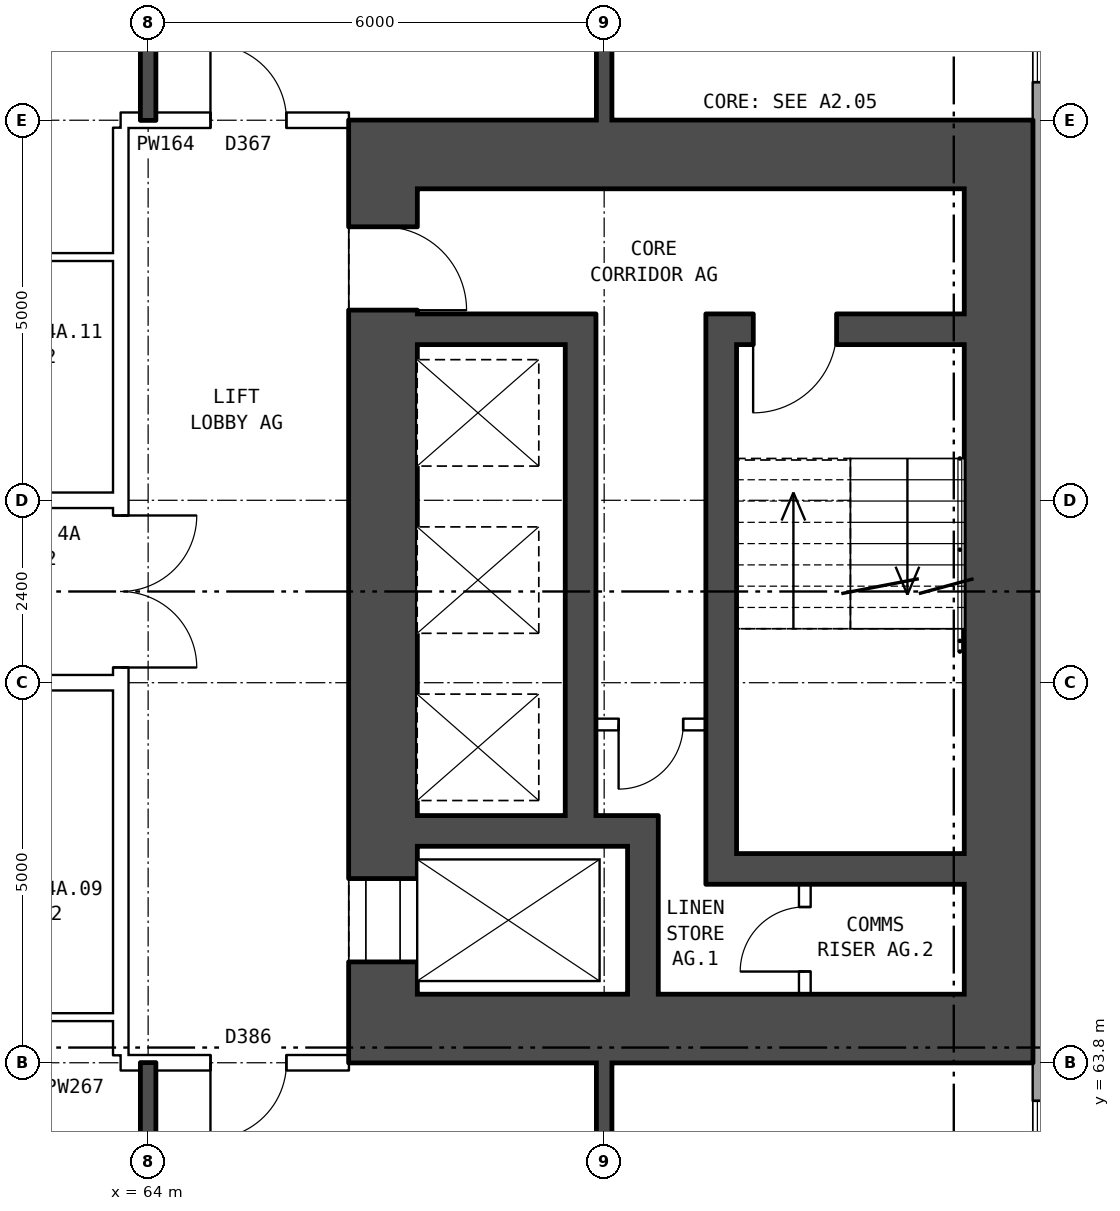
"""IFC4 building model, lengths in metres.
Left out: names, types, materials, properties, quantities, classifications, styles, units other than length and angle.
Written with IfcOpenShell. Run it as: python <this file> out.ifc"""

import sys

from ifc_helpers import new_model, si_unit, direction, frame, frame_2d, origin, place, context, subcontext, project, spatial, rectangle, extrude, element, fill, save


model = new_model("IFC4")
c1 = context("Model", 3, precision=1e-05, world=origin(), true_north=direction((0.0, 1.0)))
c2 = subcontext(c1, "Body", "Model", "MODEL_VIEW")
j1 = project(units=[si_unit("LENGTHUNIT", "METRE"), si_unit("PLANEANGLEUNIT", "RADIAN")], contexts=[c1])
p1 = place(None, origin())
s1 = spatial("IfcSite", under=j1, at=p1, CompositionType="ELEMENT")
p2 = place(p1, origin())
s2 = spatial("IfcBuilding", under=s1, at=p2, CompositionType="ELEMENT")
p3 = place(p2, frame((0.0, 0.0, 19.5)))
s3 = spatial("IfcBuildingStorey", under=s2, at=p3, CompositionType="ELEMENT", Elevation=19.5)
p4 = place(p3, frame((75.82, 57.075, 0.0), z_axis=(0.0, 0.0, 1.0), x_axis=(0.0, 1.0, 0.0)))
e1 = element("IfcWall", 1, at=p4, inside=s3, PredefinedType="STANDARD", context=c2, shape_type="SweptSolid", body=[
    extrude(rectangle(XDim=25.851, YDim=0.36, at=frame_2d((12.925, 0.0))), origin(), (0.0, 0.0, 1.0), 2.85),
])
p5 = place(p4, frame((1.475, 0.0, 0.8)))
e2 = element("IfcOpeningElement", 2, at=p5, cuts=e1, PredefinedType="OPENING", context=c2, shape_type="SweptSolid", body=[
    extrude(rectangle(XDim=1.0, YDim=1.2, at=frame_2d((0.5, 0.6))), frame((0.0, 0.19, 0.0), z_axis=(0.0, -1.0, 0.0), x_axis=(1.0, 0.0, 0.0)), (0.0, 0.0, 1.0), 0.38),
])
p6 = place(p4, frame((4.625, 0.0, 0.8)))
e3 = element("IfcOpeningElement", 3, at=p6, cuts=e1, PredefinedType="OPENING", context=c2, shape_type="SweptSolid", body=[
    extrude(rectangle(XDim=1.6, YDim=1.8, at=frame_2d((0.8, 0.9))), frame((0.0, 0.19, 0.0), z_axis=(0.0, -1.0, 0.0), x_axis=(1.0, 0.0, 0.0)), (0.0, 0.0, 1.0), 0.38),
])
p7 = place(p4, frame((19.625, 0.0, 0.8)))
e4 = element("IfcOpeningElement", 4, at=p7, cuts=e1, PredefinedType="OPENING", context=c2, shape_type="SweptSolid", body=[
    extrude(rectangle(XDim=1.6, YDim=1.8, at=frame_2d((0.8, 0.9))), frame((0.0, 0.19, 0.0), z_axis=(0.0, -1.0, 0.0), x_axis=(1.0, 0.0, 0.0)), (0.0, 0.0, 1.0), 0.38),
])
p8 = place(p4, frame((21.525, 0.0, 0.8)))
e5 = element("IfcOpeningElement", 5, at=p8, cuts=e1, PredefinedType="OPENING", context=c2, shape_type="SweptSolid", body=[
    extrude(rectangle(XDim=1.4, YDim=1.8, at=frame_2d((0.7, 0.9))), frame((0.0, 0.19, 0.0), z_axis=(0.0, -1.0, 0.0), x_axis=(1.0, 0.0, 0.0)), (0.0, 0.0, 1.0), 0.38),
])
p9 = place(p4, frame((2.775, 0.0, 0.8)))
e6 = element("IfcOpeningElement", 6, at=p9, cuts=e1, PredefinedType="OPENING", context=c2, shape_type="SweptSolid", body=[
    extrude(rectangle(XDim=1.4, YDim=1.8, at=frame_2d((0.7, 0.9))), frame((0.0, 0.19, 0.0), z_axis=(0.0, -1.0, 0.0), x_axis=(1.0, 0.0, 0.0)), (0.0, 0.0, 1.0), 0.38),
])
p10 = place(p4, frame((23.225, 0.0, 0.8)))
e7 = element("IfcOpeningElement", 7, at=p10, cuts=e1, PredefinedType="OPENING", context=c2, shape_type="SweptSolid", body=[
    extrude(rectangle(XDim=1.0, YDim=1.2, at=frame_2d((0.5, 0.6))), frame((0.0, 0.19, 0.0), z_axis=(0.0, -1.0, 0.0), x_axis=(1.0, 0.0, 0.0)), (0.0, 0.0, 1.0), 0.38),
])
p11 = place(p3, frame((67.09, 64.7, 0.0), z_axis=(0.0, 0.0, 1.0), x_axis=(0.0, 1.0, 0.0)))
e8 = element("IfcWall", 8, at=p11, inside=s3, PredefinedType="SHEAR", context=c2, shape_type="SweptSolid", body=[
    extrude(rectangle(XDim=10.6, YDim=0.9, at=frame_2d((5.3, 0.0))), origin(), (0.0, 0.0, 1.0), 2.85),
])
p12 = place(p11, frame((0.425, 0.0, 0.0)))
e9 = element("IfcOpeningElement", 9, at=p12, cuts=e8, PredefinedType="OPENING", context=c2, shape_type="SweptSolid", body=[
    extrude(rectangle(XDim=1.1, YDim=2.1, at=frame_2d((0.55, 1.05))), frame((0.0, 0.46, 0.0), z_axis=(0.0, -1.0, 0.0), x_axis=(1.0, 0.0, 0.0)), (0.0, 0.0, 1.0), 0.92),
])
p13 = place(p11, frame((9.0, 0.0, 0.0)))
e10 = element("IfcOpeningElement", 10, at=p13, cuts=e8, PredefinedType="OPENING", context=c2, shape_type="SweptSolid", body=[
    extrude(rectangle(XDim=1.1, YDim=2.1, at=frame_2d((0.55, 1.05))), frame((0.0, 0.46, 0.0), z_axis=(0.0, -1.0, 0.0), x_axis=(1.0, 0.0, 0.0)), (0.0, 0.0, 1.0), 0.92),
])
p14 = place(p3, frame((75.19, 64.7, 0.0), z_axis=(0.0, 0.0, 1.0), x_axis=(0.0, 1.0, 0.0)))
e11 = element("IfcWall", 11, at=p14, inside=s3, PredefinedType="SHEAR", context=c2, shape_type="SweptSolid", body=[
    extrude(rectangle(XDim=10.6, YDim=0.9, at=frame_2d((5.3, 0.0))), origin(), (0.0, 0.0, 1.0), 2.85),
])
for number, where, z_axis, x_axis in (
    (12, (66.64, 64.25, 0.0), (0.0, 0.0, 1.0), (1.0, 0.0, 0.0)),
    (13, (66.64, 75.75, 0.0), (0.0, 0.0, 1.0), (1.0, 0.0, 0.0)),
):
    element("IfcWall", number, at=place(p3, frame(where, z_axis=z_axis, x_axis=x_axis)), inside=s3, PredefinedType="SHEAR", context=c2, shape_type="SweptSolid", body=[
        extrude(rectangle(XDim=9.0, YDim=0.9, at=frame_2d((4.5, 0.0))), origin(), (0.0, 0.0, 1.0), 2.85),
    ])
p15 = place(p3, frame((71.74, 66.35, 0.0), z_axis=(0.0, 0.0, 1.0), x_axis=(1.0, 0.0, 0.0)))
e14 = element("IfcWall", 14, at=p15, inside=s3, PredefinedType="SHEAR", context=c2, shape_type="SweptSolid", body=[
    extrude(rectangle(XDim=3.0, YDim=0.4, at=frame_2d((1.5, 0.0))), origin(), (0.0, 0.0, 1.0), 2.85),
])
p16 = place(p3, frame((67.54, 66.85, 0.0), z_axis=(0.0, 0.0, 1.0), x_axis=(1.0, 0.0, 0.0)))
e15 = element("IfcWall", 15, at=p16, inside=s3, PredefinedType="SHEAR", context=c2, shape_type="SweptSolid", body=[
    extrude(rectangle(XDim=3.17, YDim=0.4, at=frame_2d((1.585, 0.0))), origin(), (0.0, 0.0, 1.0), 2.85),
])
p17 = place(p3, frame((69.89, 68.25, 0.0), z_axis=(0.0, 0.0, 1.0), x_axis=(1.0, 0.0, 0.0)))
e16 = element("IfcWall", 16, at=p17, inside=s3, PredefinedType="PARTITIONING", context=c2, shape_type="SweptSolid", body=[
    extrude(rectangle(XDim=1.45, YDim=0.15, at=frame_2d((0.725, 0.0))), origin(), (0.0, 0.0, 1.0), 2.85),
])
p18 = place(p17, frame((0.3, 0.0, 0.0)))
e17 = element("IfcOpeningElement", 17, at=p18, cuts=e16, PredefinedType="OPENING", context=c2, shape_type="SweptSolid", body=[
    extrude(rectangle(XDim=0.85, YDim=2.1, at=frame_2d((0.425, 1.05))), frame((0.0, 0.085, 0.0), z_axis=(0.0, -1.0, 0.0), x_axis=(1.0, 0.0, 0.0)), (0.0, 0.0, 1.0), 0.17),
])
p19 = place(p3, frame((67.54, 73.45, 0.0), z_axis=(0.0, 0.0, 1.0), x_axis=(1.0, 0.0, 0.0)))
e18 = element("IfcWall", 18, at=p19, inside=s3, PredefinedType="SHEAR", context=c2, shape_type="SweptSolid", body=[
    extrude(rectangle(XDim=1.95, YDim=0.4, at=frame_2d((0.975, 0.0))), origin(), (0.0, 0.0, 1.0), 2.85),
])
p20 = place(p3, frame((71.74, 73.45, 0.0), z_axis=(0.0, 0.0, 1.0), x_axis=(1.0, 0.0, 0.0)))
e19 = element("IfcWall", 19, at=p20, inside=s3, PredefinedType="SHEAR", context=c2, shape_type="SweptSolid", body=[
    extrude(rectangle(XDim=3.0, YDim=0.4, at=frame_2d((1.5, 0.0))), origin(), (0.0, 0.0, 1.0), 2.85),
])
p21 = place(p20, frame((0.22, 0.0, 0.0)))
e20 = element("IfcOpeningElement", 20, at=p21, cuts=e19, PredefinedType="OPENING", context=c2, shape_type="SweptSolid", body=[
    extrude(rectangle(XDim=1.1, YDim=2.1, at=frame_2d((0.55, 1.05))), frame((0.0, 0.21, 0.0), z_axis=(0.0, -1.0, 0.0), x_axis=(1.0, 0.0, 0.0)), (0.0, 0.0, 1.0), 0.42),
])
p22 = place(p3, frame((69.69, 67.05, 0.0), z_axis=(0.0, 0.0, 1.0), x_axis=(0.0, 1.0, 0.0)))
e21 = element("IfcWall", 21, at=p22, inside=s3, PredefinedType="SHEAR", context=c2, shape_type="SweptSolid", body=[
    extrude(rectangle(XDim=6.6, YDim=0.4, at=frame_2d((3.3, 0.0))), origin(), (0.0, 0.0, 1.0), 2.85),
])
p23 = place(p3, frame((70.51, 64.7, 0.0), z_axis=(0.0, 0.0, 1.0), x_axis=(0.0, 1.0, 0.0)))
e22 = element("IfcWall", 22, at=p23, inside=s3, PredefinedType="SHEAR", context=c2, shape_type="SweptSolid", body=[
    extrude(rectangle(XDim=1.95, YDim=0.4, at=frame_2d((0.975, 0.0))), origin(), (0.0, 0.0, 1.0), 2.85),
])
p24 = place(p3, frame((71.54, 66.15, 0.0), z_axis=(0.0, 0.0, 1.0), x_axis=(0.0, 1.0, 0.0)))
e23 = element("IfcWall", 23, at=p24, inside=s3, PredefinedType="SHEAR", context=c2, shape_type="SweptSolid", body=[
    extrude(rectangle(XDim=7.5, YDim=0.4, at=frame_2d((3.75, 0.0))), origin(), (0.0, 0.0, 1.0), 2.85),
])
p25 = place(p3, frame((72.64, 64.7, 0.0), z_axis=(0.0, 0.0, 1.0), x_axis=(0.0, 1.0, 0.0)))
e24 = element("IfcWall", 24, at=p25, inside=s3, PredefinedType="PARTITIONING", context=c2, shape_type="SweptSolid", body=[
    extrude(rectangle(XDim=1.45, YDim=0.15, at=frame_2d((0.725, 0.0))), origin(), (0.0, 0.0, 1.0), 2.85),
])
p26 = place(p25, frame((0.3, 0.0, 0.0)))
e25 = element("IfcOpeningElement", 25, at=p26, cuts=e24, PredefinedType="OPENING", context=c2, shape_type="SweptSolid", body=[
    extrude(rectangle(XDim=0.85, YDim=2.1, at=frame_2d((0.425, 1.05))), frame((0.0, 0.085, 0.0), z_axis=(0.0, -1.0, 0.0), x_axis=(1.0, 0.0, 0.0)), (0.0, 0.0, 1.0), 0.17),
])
p27 = place(p3, frame((63.64, 63.9, 0.0), z_axis=(0.0, 0.0, 1.0), x_axis=(0.0, 1.0, 0.0)))
e26 = element("IfcWall", 26, at=p27, inside=s3, PredefinedType="PARTITIONING", context=c2, shape_type="SweptSolid", body=[
    extrude(rectangle(XDim=12.2, YDim=0.2, at=frame_2d((6.1, 0.0))), origin(), (0.0, 0.0, 1.0), 2.85),
])
p28 = place(p27, frame((5.1, 0.0, 0.0)))
e27 = element("IfcOpeningElement", 27, at=p28, cuts=e26, PredefinedType="OPENING", context=c2, shape_type="SweptSolid", body=[
    extrude(rectangle(XDim=2.0, YDim=2.1, at=frame_2d((1.0, 1.05))), frame((0.0, 0.11, 0.0), z_axis=(0.0, -1.0, 0.0), x_axis=(1.0, 0.0, 0.0)), (0.0, 0.0, 1.0), 0.22),
])
p29 = place(p3, frame((63.64, 63.8, 0.0), z_axis=(0.0, 0.0, 1.0), x_axis=(1.0, 0.0, 0.0)))
e28 = element("IfcWall", 28, at=p29, inside=s3, PredefinedType="PARTITIONING", context=c2, shape_type="SweptSolid", body=[
    extrude(rectangle(XDim=3.0, YDim=0.2, at=frame_2d((1.5, 0.0))), origin(), (0.0, 0.0, 1.0), 2.85),
])
p30 = place(p29, frame((1.18, 0.0, 0.0)))
e29 = element("IfcOpeningElement", 29, at=p30, cuts=e28, PredefinedType="OPENING", context=c2, shape_type="SweptSolid", body=[
    extrude(rectangle(XDim=1.0, YDim=2.1, at=frame_2d((0.5, 1.05))), frame((0.0, 0.11, 0.0), z_axis=(0.0, -1.0, 0.0), x_axis=(1.0, 0.0, 0.0)), (0.0, 0.0, 1.0), 0.22),
])
p31 = place(p3, frame((61.0, 64.4, 0.0), z_axis=(0.0, 0.0, 1.0), x_axis=(1.0, 0.0, 0.0)))
e30 = element("IfcWall", 30, at=p31, inside=s3, PredefinedType="PARTITIONING", context=c2, shape_type="SweptSolid", body=[
    extrude(rectangle(XDim=2.64, YDim=0.1, at=frame_2d((1.32, 0.0))), origin(), (0.0, 0.0, 1.0), 2.85),
])
p32 = place(p3, frame((44.36, 68.8, 0.0), z_axis=(0.0, 0.0, 1.0), x_axis=(1.0, 0.0, 0.0)))
e31 = element("IfcWall", 31, at=p32, inside=s3, PredefinedType="PARTITIONING", context=c2, shape_type="SweptSolid", body=[
    extrude(rectangle(XDim=19.28, YDim=0.2, at=frame_2d((9.64, 0.0))), origin(), (0.0, 0.0, 1.0), 2.85),
])
p33 = place(p32, frame((14.64, 0.0, 0.0)))
e32 = element("IfcOpeningElement", 32, at=p33, cuts=e31, PredefinedType="OPENING", context=c2, shape_type="SweptSolid", body=[
    extrude(rectangle(XDim=1.0, YDim=2.1, at=frame_2d((0.5, 1.05))), frame((0.0, 0.11, 0.0), z_axis=(0.0, -1.0, 0.0), x_axis=(1.0, 0.0, 0.0)), (0.0, 0.0, 1.0), 0.22),
])
p34 = place(p32, frame((5.64, 0.0, 0.0)))
e33 = element("IfcOpeningElement", 33, at=p34, cuts=e31, PredefinedType="OPENING", context=c2, shape_type="SweptSolid", body=[
    extrude(rectangle(XDim=1.0, YDim=2.1, at=frame_2d((0.5, 1.05))), frame((0.0, 0.11, 0.0), z_axis=(0.0, -1.0, 0.0), x_axis=(1.0, 0.0, 0.0)), (0.0, 0.0, 1.0), 0.22),
])
p35 = place(p3, frame((44.36, 71.2, 0.0), z_axis=(0.0, 0.0, 1.0), x_axis=(1.0, 0.0, 0.0)))
e34 = element("IfcWall", 34, at=p35, inside=s3, PredefinedType="PARTITIONING", context=c2, shape_type="SweptSolid", body=[
    extrude(rectangle(XDim=19.28, YDim=0.2, at=frame_2d((9.64, 0.0))), origin(), (0.0, 0.0, 1.0), 2.85),
])
p36 = place(p35, frame((14.64, 0.0, 0.0)))
e35 = element("IfcOpeningElement", 35, at=p36, cuts=e34, PredefinedType="OPENING", context=c2, shape_type="SweptSolid", body=[
    extrude(rectangle(XDim=1.0, YDim=2.1, at=frame_2d((0.5, 1.05))), frame((0.0, 0.11, 0.0), z_axis=(0.0, -1.0, 0.0), x_axis=(1.0, 0.0, 0.0)), (0.0, 0.0, 1.0), 0.22),
])
p37 = place(p35, frame((5.64, 0.0, 0.0)))
e36 = element("IfcOpeningElement", 36, at=p37, cuts=e34, PredefinedType="OPENING", context=c2, shape_type="SweptSolid", body=[
    extrude(rectangle(XDim=1.0, YDim=2.1, at=frame_2d((0.5, 1.05))), frame((0.0, 0.11, 0.0), z_axis=(0.0, -1.0, 0.0), x_axis=(1.0, 0.0, 0.0)), (0.0, 0.0, 1.0), 0.22),
])
p38 = place(p3, frame((61.0, 74.4, 0.0), z_axis=(0.0, 0.0, 1.0), x_axis=(1.0, 0.0, 0.0)))
e37 = element("IfcWall", 37, at=p38, inside=s3, PredefinedType="PARTITIONING", context=c2, shape_type="SweptSolid", body=[
    extrude(rectangle(XDim=2.64, YDim=0.1, at=frame_2d((1.32, 0.0))), origin(), (0.0, 0.0, 1.0), 2.85),
])
p39 = place(p3, frame((63.64, 76.2, 0.0), z_axis=(0.0, 0.0, 1.0), x_axis=(1.0, 0.0, 0.0)))
e38 = element("IfcWall", 38, at=p39, inside=s3, PredefinedType="PARTITIONING", context=c2, shape_type="SweptSolid", body=[
    extrude(rectangle(XDim=3.0, YDim=0.2, at=frame_2d((1.5, 0.0))), origin(), (0.0, 0.0, 1.0), 2.85),
])
p40 = place(p39, frame((1.18, 0.0, 0.0)))
e39 = element("IfcOpeningElement", 39, at=p40, cuts=e38, PredefinedType="OPENING", context=c2, shape_type="SweptSolid", body=[
    extrude(rectangle(XDim=1.0, YDim=2.1, at=frame_2d((0.5, 1.05))), frame((0.0, 0.11, 0.0), z_axis=(0.0, -1.0, 0.0), x_axis=(1.0, 0.0, 0.0)), (0.0, 0.0, 1.0), 0.22),
])
for number, where, z_axis, x_axis in (
    (40, (64.0, 54.36, 0.0), (0.0, 0.0, 1.0), (0.0, 1.0, 0.0)),
    (41, (64.0, 76.2, 0.0), (0.0, 0.0, 1.0), (0.0, 1.0, 0.0)),
):
    element("IfcWall", number, at=place(p3, frame(where, z_axis=z_axis, x_axis=x_axis)), inside=s3, PredefinedType="SOLIDWALL", context=c2, shape_type="SweptSolid", body=[
        extrude(rectangle(XDim=9.44, YDim=0.2, at=frame_2d((4.72, 0.0))), origin(), (0.0, 0.0, 1.0), 2.85),
    ])
p41 = place(p3, frame((70.0, 54.36, 0.0), z_axis=(0.0, 0.0, 1.0), x_axis=(0.0, 1.0, 0.0)))
e42 = element("IfcWall", 42, at=p41, inside=s3, PredefinedType="SOLIDWALL", context=c2, shape_type="SweptSolid", body=[
    extrude(rectangle(XDim=9.44, YDim=0.2, at=frame_2d((4.72, 0.0))), origin(), (0.0, 0.0, 1.0), 2.85),
])
p42 = place(p41, frame((7.04, 0.0, 0.0)))
e43 = element("IfcOpeningElement", 43, at=p42, cuts=e42, PredefinedType="OPENING", context=c2, shape_type="SweptSolid", body=[
    extrude(rectangle(XDim=0.9, YDim=2.1, at=frame_2d((0.45, 1.05))), frame((0.0, 0.11, 0.0), z_axis=(0.0, -1.0, 0.0), x_axis=(1.0, 0.0, 0.0)), (0.0, 0.0, 1.0), 0.22),
])
p43 = place(p3, frame((70.0, 76.2, 0.0), z_axis=(0.0, 0.0, 1.0), x_axis=(0.0, 1.0, 0.0)))
e44 = element("IfcWall", 44, at=p43, inside=s3, PredefinedType="SOLIDWALL", context=c2, shape_type="SweptSolid", body=[
    extrude(rectangle(XDim=9.44, YDim=0.2, at=frame_2d((4.72, 0.0))), origin(), (0.0, 0.0, 1.0), 2.85),
])
p44 = place(p43, frame((1.5, 0.0, 0.0)))
e45 = element("IfcOpeningElement", 45, at=p44, cuts=e44, PredefinedType="OPENING", context=c2, shape_type="SweptSolid", body=[
    extrude(rectangle(XDim=0.9, YDim=2.1, at=frame_2d((0.45, 1.05))), frame((0.0, 0.11, 0.0), z_axis=(0.0, -1.0, 0.0), x_axis=(1.0, 0.0, 0.0)), (0.0, 0.0, 1.0), 0.22),
])
p45 = place(p6, origin())
e46 = element("IfcWindow", 46, at=p45, inside=s3, PartitioningType="SINGLE_PANEL", PredefinedType="WINDOW", context=c2, shape_type="SweptSolid", body=[
    extrude(rectangle(XDim=1.6, YDim=1.8, at=frame_2d((0.8, 0.9))), frame((0.0, 0.15, 0.0), z_axis=(0.0, -1.0, 0.0), x_axis=(1.0, 0.0, 0.0)), (0.0, 0.0, 1.0), 0.06),
])
fill(e3, e46)
p46 = place(p7, origin())
e47 = element("IfcWindow", 47, at=p46, inside=s3, PartitioningType="SINGLE_PANEL", PredefinedType="WINDOW", context=c2, shape_type="SweptSolid", body=[
    extrude(rectangle(XDim=1.6, YDim=1.8, at=frame_2d((0.8, 0.9))), frame((0.0, 0.15, 0.0), z_axis=(0.0, -1.0, 0.0), x_axis=(1.0, 0.0, 0.0)), (0.0, 0.0, 1.0), 0.06),
])
fill(e4, e47)
p47 = place(p12, origin())
e48 = element("IfcDoor", 48, at=p47, inside=s3, OperationType="DOUBLE_DOOR_SLIDING", PredefinedType="DOOR", context=c2, shape_type="SweptSolid", body=[
    extrude(rectangle(XDim=1.1, YDim=2.1, at=frame_2d((0.55, 1.05))), frame((0.0, -0.385, 0.0), z_axis=(0.0, -1.0, 0.0), x_axis=(1.0, 0.0, 0.0)), (0.0, 0.0, 1.0), 0.05),
])
fill(e9, e48)
p48 = place(p13, frame((1.1, 0.0, 0.0), z_axis=(0.0, 0.0, 1.0), x_axis=(-1.0, 0.0, 0.0)))
e49 = element("IfcDoor", 49, at=p48, inside=s3, OperationType="SINGLE_SWING_RIGHT", PredefinedType="DOOR", context=c2, shape_type="SweptSolid", body=[
    extrude(rectangle(XDim=1.1, YDim=2.1, at=frame_2d((0.55, 1.05))), frame((0.0, 0.435, 0.0), z_axis=(0.0, -1.0, 0.0), x_axis=(1.0, 0.0, 0.0)), (0.0, 0.0, 1.0), 0.05),
])
fill(e10, e49)
p49 = place(p21, frame((1.1, 0.0, 0.0), z_axis=(0.0, 0.0, 1.0), x_axis=(-1.0, 0.0, 0.0)))
e50 = element("IfcDoor", 50, at=p49, inside=s3, OperationType="SINGLE_SWING_RIGHT", PredefinedType="DOOR", context=c2, shape_type="SweptSolid", body=[
    extrude(rectangle(XDim=1.1, YDim=2.1, at=frame_2d((0.55, 1.05))), frame((0.0, 0.025, 0.0), z_axis=(0.0, -1.0, 0.0), x_axis=(1.0, 0.0, 0.0)), (0.0, 0.0, 1.0), 0.05),
])
fill(e20, e50)
p50 = place(p18, frame((0.85, 0.0, 0.0), z_axis=(0.0, 0.0, 1.0), x_axis=(-1.0, 0.0, 0.0)))
e51 = element("IfcDoor", 51, at=p50, inside=s3, OperationType="SINGLE_SWING_RIGHT", PredefinedType="DOOR", context=c2, shape_type="SweptSolid", body=[
    extrude(rectangle(XDim=0.85, YDim=2.1, at=frame_2d((0.425, 1.05))), frame((0.0, 0.025, 0.0), z_axis=(0.0, -1.0, 0.0), x_axis=(1.0, 0.0, 0.0)), (0.0, 0.0, 1.0), 0.05),
])
fill(e17, e51)
p51 = place(p26, origin())
e52 = element("IfcDoor", 52, at=p51, inside=s3, OperationType="SINGLE_SWING_LEFT", PredefinedType="DOOR", context=c2, shape_type="SweptSolid", body=[
    extrude(rectangle(XDim=0.85, YDim=2.1, at=frame_2d((0.425, 1.05))), frame((0.0, 0.025, 0.0), z_axis=(0.0, -1.0, 0.0), x_axis=(1.0, 0.0, 0.0)), (0.0, 0.0, 1.0), 0.05),
])
fill(e25, e52)
p52 = place(p28, frame((2.0, 0.0, 0.0), z_axis=(0.0, 0.0, 1.0), x_axis=(-1.0, 0.0, 0.0)))
e53 = element("IfcDoor", 53, at=p52, inside=s3, OperationType="DOUBLE_DOOR_SINGLE_SWING", PredefinedType="DOOR", context=c2, shape_type="SweptSolid", body=[
    extrude(rectangle(XDim=2.0, YDim=2.1, at=frame_2d((1.0, 1.05))), frame((0.0, 0.025, 0.0), z_axis=(0.0, -1.0, 0.0), x_axis=(1.0, 0.0, 0.0)), (0.0, 0.0, 1.0), 0.05),
])
fill(e27, e53)
p53 = place(p30, frame((1.0, 0.0, 0.0), z_axis=(0.0, 0.0, 1.0), x_axis=(-1.0, 0.0, 0.0)))
e54 = element("IfcDoor", 54, at=p53, inside=s3, OperationType="SINGLE_SWING_RIGHT", PredefinedType="DOOR", context=c2, shape_type="SweptSolid", body=[
    extrude(rectangle(XDim=1.0, YDim=2.1, at=frame_2d((0.5, 1.05))), frame((0.0, 0.025, 0.0), z_axis=(0.0, -1.0, 0.0), x_axis=(1.0, 0.0, 0.0)), (0.0, 0.0, 1.0), 0.05),
])
fill(e29, e54)
p54 = place(p40, origin())
e55 = element("IfcDoor", 55, at=p54, inside=s3, OperationType="SINGLE_SWING_LEFT", PredefinedType="DOOR", context=c2, shape_type="SweptSolid", body=[
    extrude(rectangle(XDim=1.0, YDim=2.1, at=frame_2d((0.5, 1.05))), frame((0.0, 0.025, 0.0), z_axis=(0.0, -1.0, 0.0), x_axis=(1.0, 0.0, 0.0)), (0.0, 0.0, 1.0), 0.05),
])
fill(e39, e55)
save(model, sys.argv[1])
